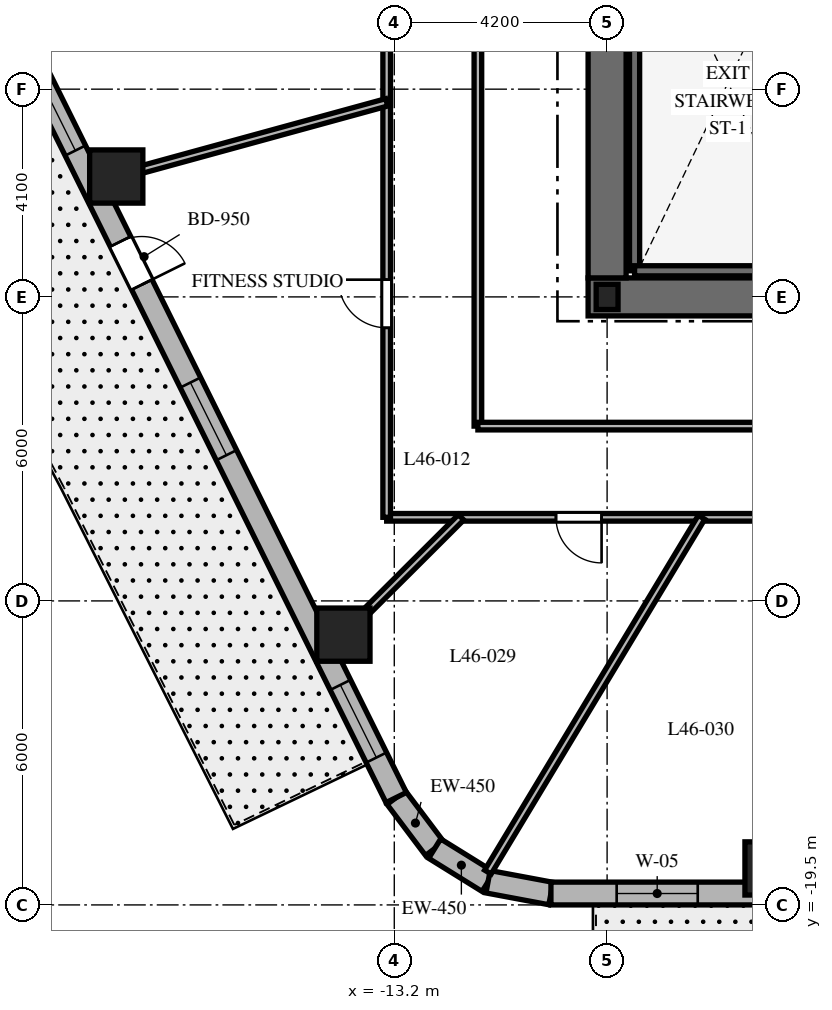
"""IFC4 building model, lengths in metres.
Left out: names, types, materials, properties, quantities, classifications, styles, units other than length and angle.
Written with IfcOpenShell. Run it as: python <this file> out.ifc"""

import sys

from ifc_helpers import new_model, si_unit, direction, frame, frame_2d, origin, origin_2d, place, context, subcontext, project, spatial, rectangle, i_section, extrude, element, fill, save


model = new_model("IFC4")
c1 = context("Model", 3, precision=1e-05, world=origin(), true_north=direction((0.0, 1.0)))
c2 = subcontext(c1, "Body", "Model", "MODEL_VIEW")
j1 = project(units=[si_unit("LENGTHUNIT", "METRE"), si_unit("PLANEANGLEUNIT", "RADIAN")], contexts=[c1])
p1 = place(None, origin())
s1 = spatial("IfcSite", under=j1, at=p1, CompositionType="ELEMENT")
p2 = place(p1, origin())
s2 = spatial("IfcBuilding", under=s1, at=p2, CompositionType="ELEMENT")
p3 = place(p2, frame((0.0, 0.0, 186.7)))
s3 = spatial("IfcBuildingStorey", under=s2, at=p3, CompositionType="ELEMENT", Elevation=186.7)
p4 = place(p3, frame((-9.375, -7.5, 0.0), z_axis=(0.0, 0.0, 1.0), x_axis=(1.0, 0.0, 0.0)))
e1 = element("IfcWall", 1, at=p4, inside=s3, PredefinedType="SHEAR", context=c2, shape_type="SweptSolid", body=[
    extrude(rectangle(XDim=18.75, YDim=0.75, at=frame_2d((9.375, 0.0))), origin(), (0.0, 0.0, 1.0), 3.7),
])
p5 = place(p4, frame((9.425, 0.0, 0.0)))
e2 = element("IfcOpeningElement", 2, at=p5, cuts=e1, PredefinedType="OPENING", context=c2, shape_type="SweptSolid", body=[
    extrude(rectangle(XDim=1.0, YDim=2.15, at=frame_2d((0.5, 1.075))), frame((0.0, 0.385, 0.0), z_axis=(0.0, -1.0, 0.0), x_axis=(1.0, 0.0, 0.0)), (0.0, 0.0, 1.0), 0.77),
])
p6 = place(p3, frame((-9.0, -7.125, 0.0), z_axis=(0.0, 0.0, 1.0), x_axis=(0.0, 1.0, 0.0)))
e3 = element("IfcWall", 3, at=p6, inside=s3, PredefinedType="SHEAR", context=c2, shape_type="SweptSolid", body=[
    extrude(rectangle(XDim=14.25, YDim=0.75, at=frame_2d((7.125, 0.0))), origin(), (0.0, 0.0, 1.0), 3.7),
])
p7 = place(p6, frame((10.25, 0.0, 0.0)))
e4 = element("IfcOpeningElement", 4, at=p7, cuts=e3, PredefinedType="OPENING", context=c2, shape_type="SweptSolid", body=[
    extrude(rectangle(XDim=1.05, YDim=2.15, at=frame_2d((0.525, 1.075))), frame((0.0, 0.385, 0.0), z_axis=(0.0, -1.0, 0.0), x_axis=(1.0, 0.0, 0.0)), (0.0, 0.0, 1.0), 0.77),
])
p8 = place(p3, frame((-8.458, -6.985, 0.0), z_axis=(0.0, 0.0, 1.0), x_axis=(0.0, 1.0, 0.0)))
e5 = element("IfcWall", 5, at=p8, inside=s3, PredefinedType="SHEAR", context=c2, shape_type="SweptSolid", body=[
    extrude(rectangle(XDim=9.143, YDim=0.2, at=frame_2d((4.572, 0.0))), origin(), (0.0, 0.0, 1.0), 3.7),
])
p9 = place(p3, frame((-8.458, -6.985, 0.0), z_axis=(0.0, 0.0, 1.0), x_axis=(1.0, 0.0, 0.0)))
e6 = element("IfcWall", 6, at=p9, inside=s3, PredefinedType="SHEAR", context=c2, shape_type="SweptSolid", body=[
    extrude(rectangle(XDim=3.686, YDim=0.2, at=frame_2d((1.843, 0.0))), origin(), (0.0, 0.0, 1.0), 3.7),
])
p10 = place(p3, frame((-9.0, -7.5, 0.0), z_axis=(0.0, 0.0, 1.0), x_axis=(1.0, 0.0, 0.0)))
e7 = element("IfcColumn", 7, at=p10, inside=s3, PredefinedType="COLUMN", context=c2, shape_type="SweptSolid", body=[
    extrude(i_section(OverallWidth=0.432, OverallDepth=0.498, WebThickness=0.056, FlangeThickness=0.089, at=origin_2d()), origin(), (0.0, 0.0, 1.0), 3.7),
])
for number, where, z_axis, x_axis in (
    (8, (-5.755, -18.78, 0.0), (0.0, 0.0, 1.0), (1.0, 0.0, 0.0)),
    (9, (-18.687, -5.124, 0.0), (0.0, 0.0, 1.0), (1.0, 0.0, 0.0)),
    (10, (-14.204, -14.166, 0.0), (0.0, 0.0, 1.0), (1.0, 0.0, 0.0)),
):
    element("IfcColumn", number, at=place(p3, frame(where, z_axis=z_axis, x_axis=x_axis)), inside=s3, PredefinedType="COLUMN", context=c2, shape_type="SweptSolid", body=[
        extrude(rectangle(XDim=1.05, YDim=1.05, at=origin_2d()), origin(), (0.0, 0.0, 1.0), 3.7),
    ])
p11 = place(p3, frame((-13.162, -17.381, 0.0), z_axis=(0.0, 0.0, 1.0), x_axis=(0.601515770517, -0.798860925205, 0.0)))
e11 = element("IfcWall", 11, at=p11, inside=s3, PredefinedType="SOLIDWALL", context=c2, shape_type="SweptSolid", body=[
    extrude(rectangle(XDim=1.262, YDim=0.45, at=frame_2d((0.631, 0.0))), origin(), (0.0, 0.0, 1.0), 3.4),
])
p12 = place(p3, frame((-12.403, -18.389, 0.0), z_axis=(0.0, 0.0, 1.0), x_axis=(0.849795170926, -0.527113049991, 0.0)))
e12 = element("IfcWall", 12, at=p12, inside=s3, PredefinedType="SOLIDWALL", context=c2, shape_type="SweptSolid", body=[
    extrude(rectangle(XDim=1.241, YDim=0.45, at=frame_2d((0.62, 0.0))), origin(), (0.0, 0.0, 1.0), 3.4),
])
p13 = place(p3, frame((-11.349, -19.043, 0.0), z_axis=(0.0, 0.0, 1.0), x_axis=(0.982931267051, -0.183973161772, 0.0)))
e13 = element("IfcWall", 13, at=p13, inside=s3, PredefinedType="SOLIDWALL", context=c2, shape_type="SweptSolid", body=[
    extrude(rectangle(XDim=1.262, YDim=0.45, at=frame_2d((0.631, 0.0))), origin(), (0.0, 0.0, 1.0), 3.4),
])
p14 = place(p3, frame((-10.108, -19.275, 0.0), z_axis=(0.0, 0.0, 1.0), x_axis=(1.0, 0.0, 0.0)))
e14 = element("IfcWall", 14, at=p14, inside=s3, PredefinedType="SOLIDWALL", context=c2, shape_type="SweptSolid", body=[
    extrude(rectangle(XDim=21.829, YDim=0.45, at=frame_2d((10.915, 0.0))), origin(), (0.0, 0.0, 1.0), 3.4),
])
p15 = place(p14, frame((5.503, 0.0, 0.0)))
e15 = element("IfcOpeningElement", 15, at=p15, cuts=e14, PredefinedType="OPENING", context=c2, shape_type="SweptSolid", body=[
    extrude(rectangle(XDim=1.0, YDim=2.15, at=frame_2d((0.5, 1.075))), frame((0.0, 0.235, 0.0), z_axis=(0.0, -1.0, 0.0), x_axis=(1.0, 0.0, 0.0)), (0.0, 0.0, 1.0), 0.47),
])
p16 = place(p14, frame((1.297, 0.0, 0.8)))
e16 = element("IfcOpeningElement", 16, at=p16, cuts=e14, PredefinedType="OPENING", context=c2, shape_type="SweptSolid", body=[
    extrude(rectangle(XDim=1.6, YDim=1.75, at=frame_2d((0.8, 0.875))), frame((0.0, 0.235, 0.0), z_axis=(0.0, -1.0, 0.0), x_axis=(1.0, 0.0, 0.0)), (0.0, 0.0, 1.0), 0.47),
])
p17 = place(p14, frame((10.115, 0.0, 0.8)))
e17 = element("IfcOpeningElement", 17, at=p17, cuts=e14, PredefinedType="OPENING", context=c2, shape_type="SweptSolid", body=[
    extrude(rectangle(XDim=1.6, YDim=1.75, at=frame_2d((0.8, 0.875))), frame((0.0, 0.235, 0.0), z_axis=(0.0, -1.0, 0.0), x_axis=(1.0, 0.0, 0.0)), (0.0, 0.0, 1.0), 0.47),
])
p18 = place(p14, frame((18.933, 0.0, 0.8)))
e18 = element("IfcOpeningElement", 18, at=p18, cuts=e14, PredefinedType="OPENING", context=c2, shape_type="SweptSolid", body=[
    extrude(rectangle(XDim=1.6, YDim=1.75, at=frame_2d((0.8, 0.875))), frame((0.0, 0.235, 0.0), z_axis=(0.0, -1.0, 0.0), x_axis=(1.0, 0.0, 0.0)), (0.0, 0.0, 1.0), 0.47),
])
p19 = place(p3, frame((-20.618, -2.344, 0.0), z_axis=(0.0, 0.0, 1.0), x_axis=(0.444243691097, -0.895905990002, 0.0)))
e19 = element("IfcWall", 19, at=p19, inside=s3, PredefinedType="SOLIDWALL", context=c2, shape_type="SweptSolid", body=[
    extrude(rectangle(XDim=16.784, YDim=0.45, at=frame_2d((8.392, 0.0))), origin(), (0.0, 0.0, 1.0), 3.4),
])
p20 = place(p19, frame((4.535, 0.0, 0.0)))
e20 = element("IfcOpeningElement", 20, at=p20, cuts=e19, PredefinedType="OPENING", context=c2, shape_type="SweptSolid", body=[
    extrude(rectangle(XDim=0.95, YDim=2.15, at=frame_2d((0.475, 1.075))), frame((0.0, 0.235, 0.0), z_axis=(0.0, -1.0, 0.0), x_axis=(1.0, 0.0, 0.0)), (0.0, 0.0, 1.0), 0.47),
])
p21 = place(p19, frame((0.931, 0.0, 0.8)))
e21 = element("IfcOpeningElement", 21, at=p21, cuts=e19, PredefinedType="OPENING", context=c2, shape_type="SweptSolid", body=[
    extrude(rectangle(XDim=1.6, YDim=1.75, at=frame_2d((0.8, 0.875))), frame((0.0, 0.235, 0.0), z_axis=(0.0, -1.0, 0.0), x_axis=(1.0, 0.0, 0.0)), (0.0, 0.0, 1.0), 0.47),
])
p22 = place(p19, frame((7.642, 0.0, 0.8)))
e22 = element("IfcOpeningElement", 22, at=p22, cuts=e19, PredefinedType="OPENING", context=c2, shape_type="SweptSolid", body=[
    extrude(rectangle(XDim=1.6, YDim=1.75, at=frame_2d((0.8, 0.875))), frame((0.0, 0.235, 0.0), z_axis=(0.0, -1.0, 0.0), x_axis=(1.0, 0.0, 0.0)), (0.0, 0.0, 1.0), 0.47),
])
p23 = place(p19, frame((14.303, 0.0, 0.8)))
e23 = element("IfcOpeningElement", 23, at=p23, cuts=e19, PredefinedType="OPENING", context=c2, shape_type="SweptSolid", body=[
    extrude(rectangle(XDim=1.6, YDim=1.75, at=frame_2d((0.8, 0.875))), frame((0.0, 0.235, 0.0), z_axis=(0.0, -1.0, 0.0), x_axis=(1.0, 0.0, 0.0)), (0.0, 0.0, 1.0), 0.47),
])
p24 = place(p3, frame((13.35, -11.85, 0.0), z_axis=(0.0, 0.0, 1.0), x_axis=(-1.0, 0.0, 0.0)))
e24 = element("IfcWall", 24, at=p24, inside=s3, PredefinedType="PARTITIONING", context=c2, shape_type="SweptSolid", body=[
    extrude(rectangle(XDim=26.7, YDim=0.15, at=frame_2d((13.35, 0.0))), origin(), (0.0, 0.0, 1.0), 2.84),
])
p25 = place(p24, frame((22.459, 0.0, 0.0)))
e25 = element("IfcOpeningElement", 25, at=p25, cuts=e24, PredefinedType="OPENING", context=c2, shape_type="SweptSolid", body=[
    extrude(rectangle(XDim=0.9, YDim=2.03, at=frame_2d((0.45, 1.015))), frame((0.0, 0.085, 0.0), z_axis=(0.0, -1.0, 0.0), x_axis=(1.0, 0.0, 0.0)), (0.0, 0.0, 1.0), 0.17),
])
p26 = place(p24, frame((18.304, 0.0, 0.0)))
e26 = element("IfcOpeningElement", 26, at=p26, cuts=e24, PredefinedType="OPENING", context=c2, shape_type="SweptSolid", body=[
    extrude(rectangle(XDim=0.9, YDim=2.03, at=frame_2d((0.45, 1.015))), frame((0.0, 0.085, 0.0), z_axis=(0.0, -1.0, 0.0), x_axis=(1.0, 0.0, 0.0)), (0.0, 0.0, 1.0), 0.17),
])
p27 = place(p24, frame((12.362, 0.0, 0.0)))
e27 = element("IfcOpeningElement", 27, at=p27, cuts=e24, PredefinedType="OPENING", context=c2, shape_type="SweptSolid", body=[
    extrude(rectangle(XDim=0.95, YDim=2.03, at=frame_2d((0.475, 1.015))), frame((0.0, 0.085, 0.0), z_axis=(0.0, -1.0, 0.0), x_axis=(1.0, 0.0, 0.0)), (0.0, 0.0, 1.0), 0.17),
])
p28 = place(p24, frame((3.995, 0.0, 0.0)))
e28 = element("IfcOpeningElement", 28, at=p28, cuts=e24, PredefinedType="OPENING", context=c2, shape_type="SweptSolid", body=[
    extrude(rectangle(XDim=0.95, YDim=2.03, at=frame_2d((0.475, 1.015))), frame((0.0, 0.085, 0.0), z_axis=(0.0, -1.0, 0.0), x_axis=(1.0, 0.0, 0.0)), (0.0, 0.0, 1.0), 0.17),
])
p29 = place(p3, frame((-13.35, -11.85, 0.0), z_axis=(0.0, 0.0, 1.0), x_axis=(0.0, 1.0, 0.0)))
e29 = element("IfcWall", 29, at=p29, inside=s3, PredefinedType="PARTITIONING", context=c2, shape_type="SweptSolid", body=[
    extrude(rectangle(XDim=23.7, YDim=0.15, at=frame_2d((11.85, 0.0))), origin(), (0.0, 0.0, 1.0), 2.84),
])
p30 = place(p29, frame((18.389, 0.0, 0.0)))
e30 = element("IfcOpeningElement", 30, at=p30, cuts=e29, PredefinedType="OPENING", context=c2, shape_type="SweptSolid", body=[
    extrude(rectangle(XDim=0.95, YDim=2.03, at=frame_2d((0.475, 1.015))), frame((0.0, 0.085, 0.0), z_axis=(0.0, -1.0, 0.0), x_axis=(1.0, 0.0, 0.0)), (0.0, 0.0, 1.0), 0.17),
])
p31 = place(p29, frame((10.751, 0.0, 0.0)))
e31 = element("IfcOpeningElement", 31, at=p31, cuts=e29, PredefinedType="OPENING", context=c2, shape_type="SweptSolid", body=[
    extrude(rectangle(XDim=0.95, YDim=2.03, at=frame_2d((0.475, 1.015))), frame((0.0, 0.085, 0.0), z_axis=(0.0, -1.0, 0.0), x_axis=(1.0, 0.0, 0.0)), (0.0, 0.0, 1.0), 0.17),
])
p32 = place(p29, frame((3.74, 0.0, 0.0)))
e32 = element("IfcOpeningElement", 32, at=p32, cuts=e29, PredefinedType="OPENING", context=c2, shape_type="SweptSolid", body=[
    extrude(rectangle(XDim=0.95, YDim=2.03, at=frame_2d((0.475, 1.015))), frame((0.0, 0.085, 0.0), z_axis=(0.0, -1.0, 0.0), x_axis=(1.0, 0.0, 0.0)), (0.0, 0.0, 1.0), 0.17),
])
p33 = place(p3, frame((-11.55, 2.7, 0.0), z_axis=(0.0, 0.0, 1.0), x_axis=(0.0, -1.0, 0.0)))
e33 = element("IfcWall", 33, at=p33, inside=s3, PredefinedType="PARTITIONING", context=c2, shape_type="SweptSolid", body=[
    extrude(rectangle(XDim=12.75, YDim=0.15, at=frame_2d((6.375, 0.0))), origin(), (0.0, 0.0, 1.0), 2.84),
])
p34 = place(p3, frame((-11.55, -10.05, 0.0), z_axis=(0.0, 0.0, 1.0), x_axis=(1.0, 0.0, 0.0)))
e34 = element("IfcWall", 34, at=p34, inside=s3, PredefinedType="PARTITIONING", context=c2, shape_type="SweptSolid", body=[
    extrude(rectangle(XDim=11.55, YDim=0.15, at=frame_2d((5.775, 0.0))), origin(), (0.0, 0.0, 1.0), 2.84),
])
p35 = place(p3, frame((-13.35, -3.661, 0.0), z_axis=(0.0, 0.0, 1.0), x_axis=(-0.964397145454, -0.264458211898, 0.0)))
e35 = element("IfcWall", 35, at=p35, inside=s3, PredefinedType="PARTITIONING", context=c2, shape_type="SweptSolid", body=[
    extrude(rectangle(XDim=6.039, YDim=0.15, at=frame_2d((3.019, 0.0))), origin(), (0.0, 0.0, 1.0), 2.64),
])
p36 = place(p3, frame((-11.882, -11.85, 0.0), z_axis=(0.0, 0.0, 1.0), x_axis=(-0.708037373639, -0.706174962407, 0.0)))
e36 = element("IfcWall", 36, at=p36, inside=s3, PredefinedType="PARTITIONING", context=c2, shape_type="SweptSolid", body=[
    extrude(rectangle(XDim=3.802, YDim=0.15, at=frame_2d((1.901, 0.0))), origin(), (0.0, 0.0, 1.0), 2.64),
])
p37 = place(p3, frame((-7.136, -11.85, 0.0), z_axis=(0.0, 0.0, 1.0), x_axis=(-0.515900673207, -0.856648408266, 0.0)))
e37 = element("IfcWall", 37, at=p37, inside=s3, PredefinedType="PARTITIONING", context=c2, shape_type="SweptSolid", body=[
    extrude(rectangle(XDim=8.174, YDim=0.15, at=frame_2d((4.087, 0.0))), origin(), (0.0, 0.0, 1.0), 2.64),
])
p38 = place(p16, origin())
e38 = element("IfcWindow", 38, at=p38, inside=s3, PartitioningType="SINGLE_PANEL", PredefinedType="WINDOW", context=c2, shape_type="SweptSolid", body=[
    extrude(rectangle(XDim=1.6, YDim=1.75, at=frame_2d((0.8, 0.875))), frame((0.0, 0.03, 0.0), z_axis=(0.0, -1.0, 0.0), x_axis=(1.0, 0.0, 0.0)), (0.0, 0.0, 1.0), 0.06),
])
fill(e16, e38)
p39 = place(p20, origin())
e39 = element("IfcDoor", 39, at=p39, inside=s3, OperationType="SINGLE_SWING_RIGHT", PredefinedType="DOOR", context=c2, shape_type="SweptSolid", body=[
    extrude(rectangle(XDim=0.95, YDim=2.15, at=frame_2d((0.475, 1.075))), frame((0.0, 0.025, 0.0), z_axis=(0.0, -1.0, 0.0), x_axis=(1.0, 0.0, 0.0)), (0.0, 0.0, 1.0), 0.05),
])
fill(e20, e39)
p40 = place(p21, origin())
e40 = element("IfcWindow", 40, at=p40, inside=s3, PartitioningType="SINGLE_PANEL", PredefinedType="WINDOW", context=c2, shape_type="SweptSolid", body=[
    extrude(rectangle(XDim=1.6, YDim=1.75, at=frame_2d((0.8, 0.875))), frame((0.0, 0.03, 0.0), z_axis=(0.0, -1.0, 0.0), x_axis=(1.0, 0.0, 0.0)), (0.0, 0.0, 1.0), 0.06),
])
fill(e21, e40)
p41 = place(p22, origin())
e41 = element("IfcWindow", 41, at=p41, inside=s3, PartitioningType="SINGLE_PANEL", PredefinedType="WINDOW", context=c2, shape_type="SweptSolid", body=[
    extrude(rectangle(XDim=1.6, YDim=1.75, at=frame_2d((0.8, 0.875))), frame((0.0, 0.03, 0.0), z_axis=(0.0, -1.0, 0.0), x_axis=(1.0, 0.0, 0.0)), (0.0, 0.0, 1.0), 0.06),
])
fill(e22, e41)
p42 = place(p23, origin())
e42 = element("IfcWindow", 42, at=p42, inside=s3, PartitioningType="SINGLE_PANEL", PredefinedType="WINDOW", context=c2, shape_type="SweptSolid", body=[
    extrude(rectangle(XDim=1.6, YDim=1.75, at=frame_2d((0.8, 0.875))), frame((0.0, 0.03, 0.0), z_axis=(0.0, -1.0, 0.0), x_axis=(1.0, 0.0, 0.0)), (0.0, 0.0, 1.0), 0.06),
])
fill(e23, e42)
p43 = place(p32, origin())
e43 = element("IfcDoor", 43, at=p43, inside=s3, OperationType="SINGLE_SWING_RIGHT", PredefinedType="DOOR", context=c2, shape_type="SweptSolid", body=[
    extrude(rectangle(XDim=0.95, YDim=2.03, at=frame_2d((0.475, 1.015))), frame((0.0, 0.025, 0.0), z_axis=(0.0, -1.0, 0.0), x_axis=(1.0, 0.0, 0.0)), (0.0, 0.0, 1.0), 0.05),
])
fill(e32, e43)
p44 = place(p25, origin())
e44 = element("IfcDoor", 44, at=p44, inside=s3, OperationType="SINGLE_SWING_LEFT", PredefinedType="DOOR", context=c2, shape_type="SweptSolid", body=[
    extrude(rectangle(XDim=0.9, YDim=2.03, at=frame_2d((0.45, 1.015))), frame((0.0, 0.025, 0.0), z_axis=(0.0, -1.0, 0.0), x_axis=(1.0, 0.0, 0.0)), (0.0, 0.0, 1.0), 0.05),
])
fill(e25, e44)
save(model, sys.argv[1])
